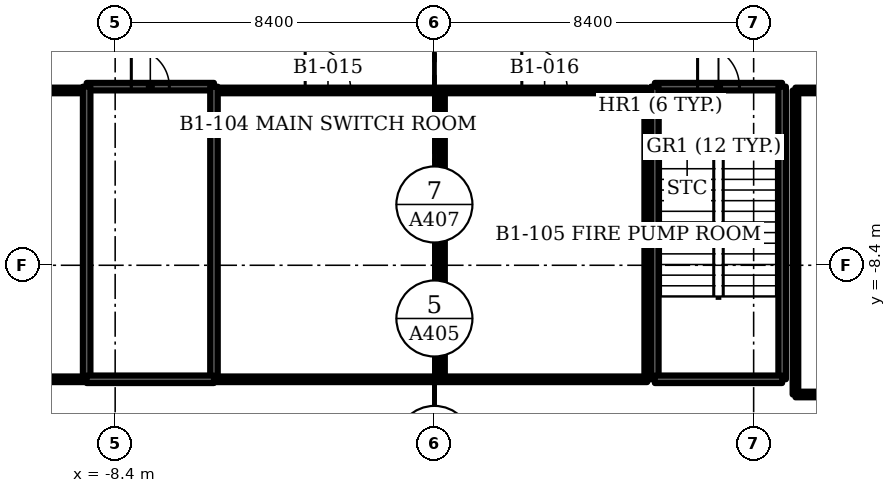
"""IFC4 building model, lengths in metres.
Left out: names, types, materials, properties, quantities, classifications, styles, units other than length and angle.
Written with IfcOpenShell. Run it as: python <this file> out.ifc"""

import sys

from ifc_helpers import new_model, si_unit, direction, frame, frame_2d, origin, place, context, subcontext, project, spatial, rectangle, extrude, element, fill, save


model = new_model("IFC4")
c1 = context("Model", 3, precision=1e-05, world=origin(), true_north=direction((0.0, 1.0)))
c2 = subcontext(c1, "Body", "Model", "MODEL_VIEW")
j1 = project(units=[si_unit("LENGTHUNIT", "METRE"), si_unit("PLANEANGLEUNIT", "RADIAN")], contexts=[c1])
p1 = place(None, origin())
s1 = spatial("IfcSite", under=j1, at=p1, CompositionType="ELEMENT")
p2 = place(p1, origin())
s2 = spatial("IfcBuilding", under=s1, at=p2, CompositionType="ELEMENT")
p3 = place(p2, frame((0.0, 0.0, -5.0)))
s3 = spatial("IfcBuildingStorey", under=s2, at=p3, CompositionType="ELEMENT", Elevation=-5.0)
p4 = place(p3, frame((5.8, -3.7, 0.0), z_axis=(0.0, 0.0, 1.0), x_axis=(1.0, 0.0, 0.0)))
e1 = element("IfcWall", 1, at=p4, inside=s3, PredefinedType="SOLIDWALL", context=c2, shape_type="SweptSolid", body=[
    extrude(rectangle(XDim=3.35, YDim=0.2, at=frame_2d((1.675, 0.0))), origin(), (0.0, 0.0, 1.0), 4.65),
])
p5 = place(p4, frame((1.125, 0.0, 0.0)))
e2 = element("IfcOpeningElement", 2, at=p5, cuts=e1, PredefinedType="OPENING", context=c2, shape_type="SweptSolid", body=[
    extrude(rectangle(XDim=1.1, YDim=2.1, at=frame_2d((0.55, 1.05))), frame((0.0, 0.1, 0.0), z_axis=(0.0, -1.0, 0.0), x_axis=(1.0, 0.0, 0.0)), (0.0, 0.0, 1.0), 0.2),
])
for number, where, z_axis, x_axis in (
    (3, (5.8, -3.7, 0.0), (0.0, 0.0, 1.0), (0.0, -1.0, 0.0)),
    (4, (9.15, -3.7, 0.0), (0.0, 0.0, 1.0), (0.0, -1.0, 0.0)),
):
    element("IfcWall", number, at=place(p3, frame(where, z_axis=z_axis, x_axis=x_axis)), inside=s3, PredefinedType="SOLIDWALL", context=c2, shape_type="SweptSolid", body=[
        extrude(rectangle(XDim=7.7, YDim=0.2, at=frame_2d((3.85, 0.0))), origin(), (0.0, 0.0, 1.0), 4.65),
    ])
p6 = place(p3, frame((5.8, -11.4, 0.0), z_axis=(0.0, 0.0, 1.0), x_axis=(1.0, 0.0, 0.0)))
e5 = element("IfcWall", 5, at=p6, inside=s3, PredefinedType="SOLIDWALL", context=c2, shape_type="SweptSolid", body=[
    extrude(rectangle(XDim=3.35, YDim=0.2, at=frame_2d((1.675, 0.0))), origin(), (0.0, 0.0, 1.0), 4.65),
])
p7 = place(p3, frame((-24.0, -3.8, 0.0), z_axis=(0.0, 0.0, 1.0), x_axis=(1.0, 0.0, 0.0)))
e6 = element("IfcWall", 6, at=p7, inside=s3, PredefinedType="PARTITIONING", context=c2, shape_type="SweptSolid", body=[
    extrude(rectangle(XDim=14.85, YDim=0.15, at=frame_2d((7.425, 0.0))), origin(), (0.0, 0.0, 1.0), 4.65),
])
p8 = place(p7, frame((3.9, 0.0, 0.0)))
e7 = element("IfcOpeningElement", 7, at=p8, cuts=e6, PredefinedType="OPENING", context=c2, shape_type="SweptSolid", body=[
    extrude(rectangle(XDim=1.2, YDim=2.1, at=frame_2d((0.6, 1.05))), frame((0.0, 0.075, 0.0), z_axis=(0.0, -1.0, 0.0), x_axis=(1.0, 0.0, 0.0)), (0.0, 0.0, 1.0), 0.15),
])
p9 = place(p7, frame((11.325, 0.0, 0.0)))
e8 = element("IfcOpeningElement", 8, at=p9, cuts=e6, PredefinedType="OPENING", context=c2, shape_type="SweptSolid", body=[
    extrude(rectangle(XDim=1.2, YDim=2.1, at=frame_2d((0.6, 1.05))), frame((0.0, 0.075, 0.0), z_axis=(0.0, -1.0, 0.0), x_axis=(1.0, 0.0, 0.0)), (0.0, 0.0, 1.0), 0.15),
])
p10 = place(p3, frame((-24.0, -11.4, 0.0), z_axis=(0.0, 0.0, 1.0), x_axis=(1.0, 0.0, 0.0)))
e9 = element("IfcWall", 9, at=p10, inside=s3, PredefinedType="PARTITIONING", context=c2, shape_type="SweptSolid", body=[
    extrude(rectangle(XDim=14.85, YDim=0.15, at=frame_2d((7.425, 0.0))), origin(), (0.0, 0.0, 1.0), 4.65),
])
p11 = place(p3, frame((-5.8, -3.8, 0.0), z_axis=(0.0, 0.0, 1.0), x_axis=(1.0, 0.0, 0.0)))
e10 = element("IfcWall", 10, at=p11, inside=s3, PredefinedType="PARTITIONING", context=c2, shape_type="SweptSolid", body=[
    extrude(rectangle(XDim=11.4, YDim=0.15, at=frame_2d((5.7, 0.0))), origin(), (0.0, 0.0, 1.0), 4.65),
])
p12 = place(p11, frame((2.4, 0.0, 0.0)))
e11 = element("IfcOpeningElement", 11, at=p12, cuts=e10, PredefinedType="OPENING", context=c2, shape_type="SweptSolid", body=[
    extrude(rectangle(XDim=1.2, YDim=2.1, at=frame_2d((0.6, 1.05))), frame((0.0, 0.075, 0.0), z_axis=(0.0, -1.0, 0.0), x_axis=(1.0, 0.0, 0.0)), (0.0, 0.0, 1.0), 0.15),
])
p13 = place(p11, frame((8.1, 0.0, 0.0)))
e12 = element("IfcOpeningElement", 12, at=p13, cuts=e10, PredefinedType="OPENING", context=c2, shape_type="SweptSolid", body=[
    extrude(rectangle(XDim=1.2, YDim=2.1, at=frame_2d((0.6, 1.05))), frame((0.0, 0.075, 0.0), z_axis=(0.0, -1.0, 0.0), x_axis=(1.0, 0.0, 0.0)), (0.0, 0.0, 1.0), 0.15),
])
p14 = place(p3, frame((-5.8, -11.4, 0.0), z_axis=(0.0, 0.0, 1.0), x_axis=(1.0, 0.0, 0.0)))
e13 = element("IfcWall", 13, at=p14, inside=s3, PredefinedType="PARTITIONING", context=c2, shape_type="SweptSolid", body=[
    extrude(rectangle(XDim=11.4, YDim=0.15, at=frame_2d((5.7, 0.0))), origin(), (0.0, 0.0, 1.0), 4.65),
])
for number, where, z_axis, x_axis in (
    (14, (0.2, -3.8, 0.0), (0.0, 0.0, 1.0), (0.0, -1.0, 0.0)),
    (15, (5.6, -3.8, 0.0), (0.0, 0.0, 1.0), (0.0, -1.0, 0.0)),
):
    element("IfcWall", number, at=place(p3, frame(where, z_axis=z_axis, x_axis=x_axis)), inside=s3, PredefinedType="PARTITIONING", context=c2, shape_type="SweptSolid", body=[
        extrude(rectangle(XDim=7.6, YDim=0.15, at=frame_2d((3.8, 0.0))), origin(), (0.0, 0.0, 1.0), 4.65),
    ])
p15 = place(p3, frame((-9.15, -3.7, 0.0), z_axis=(0.0, 0.0, 1.0), x_axis=(1.0, 0.0, 0.0)))
e16 = element("IfcWall", 16, at=p15, inside=s3, PredefinedType="SOLIDWALL", context=c2, shape_type="SweptSolid", body=[
    extrude(rectangle(XDim=3.35, YDim=0.2, at=frame_2d((1.675, 0.0))), origin(), (0.0, 0.0, 1.0), 4.65),
])
p16 = place(p15, frame((1.175, 0.0, 0.0)))
e17 = element("IfcOpeningElement", 17, at=p16, cuts=e16, PredefinedType="OPENING", context=c2, shape_type="SweptSolid", body=[
    extrude(rectangle(XDim=1.0, YDim=2.1, at=frame_2d((0.5, 1.05))), frame((0.0, 0.1, 0.0), z_axis=(0.0, -1.0, 0.0), x_axis=(1.0, 0.0, 0.0)), (0.0, 0.0, 1.0), 0.2),
])
for number, where, z_axis, x_axis in (
    (18, (-9.15, -3.7, 0.0), (0.0, 0.0, 1.0), (0.0, -1.0, 0.0)),
    (19, (-5.8, -3.7, 0.0), (0.0, 0.0, 1.0), (0.0, -1.0, 0.0)),
):
    element("IfcWall", number, at=place(p3, frame(where, z_axis=z_axis, x_axis=x_axis)), inside=s3, PredefinedType="SOLIDWALL", context=c2, shape_type="SweptSolid", body=[
        extrude(rectangle(XDim=7.7, YDim=0.2, at=frame_2d((3.85, 0.0))), origin(), (0.0, 0.0, 1.0), 4.65),
    ])
p17 = place(p3, frame((-9.15, -11.4, 0.0), z_axis=(0.0, 0.0, 1.0), x_axis=(1.0, 0.0, 0.0)))
e20 = element("IfcWall", 20, at=p17, inside=s3, PredefinedType="SOLIDWALL", context=c2, shape_type="SweptSolid", body=[
    extrude(rectangle(XDim=3.35, YDim=0.2, at=frame_2d((1.675, 0.0))), origin(), (0.0, 0.0, 1.0), 4.65),
])
p18 = place(p3, frame((9.5, -3.8, 0.0), z_axis=(0.0, 0.0, 1.0), x_axis=(1.0, 0.0, 0.0)))
e21 = element("IfcWall", 21, at=p18, inside=s3, PredefinedType="PARTITIONING", context=c2, shape_type="SweptSolid", body=[
    extrude(rectangle(XDim=14.0, YDim=0.15, at=frame_2d((7.0, 0.0))), origin(), (0.0, 0.0, 1.0), 4.65),
])
p19 = place(p18, frame((3.15, 0.0, 0.0)))
e22 = element("IfcOpeningElement", 22, at=p19, cuts=e21, PredefinedType="OPENING", context=c2, shape_type="SweptSolid", body=[
    extrude(rectangle(XDim=1.2, YDim=2.1, at=frame_2d((0.6, 1.05))), frame((0.0, 0.075, 0.0), z_axis=(0.0, -1.0, 0.0), x_axis=(1.0, 0.0, 0.0)), (0.0, 0.0, 1.0), 0.15),
])
p20 = place(p18, frame((10.15, 0.0, 0.0)))
e23 = element("IfcOpeningElement", 23, at=p20, cuts=e21, PredefinedType="OPENING", context=c2, shape_type="SweptSolid", body=[
    extrude(rectangle(XDim=1.2, YDim=2.1, at=frame_2d((0.6, 1.05))), frame((0.0, 0.075, 0.0), z_axis=(0.0, -1.0, 0.0), x_axis=(1.0, 0.0, 0.0)), (0.0, 0.0, 1.0), 0.15),
])
p21 = place(p3, frame((9.5, -11.8, 0.0), z_axis=(0.0, 0.0, 1.0), x_axis=(1.0, 0.0, 0.0)))
e24 = element("IfcWall", 24, at=p21, inside=s3, PredefinedType="PARTITIONING", context=c2, shape_type="SweptSolid", body=[
    extrude(rectangle(XDim=14.0, YDim=0.15, at=frame_2d((7.0, 0.0))), origin(), (0.0, 0.0, 1.0), 4.65),
])
p22 = place(p3, frame((9.5, -3.8, 0.0), z_axis=(0.0, 0.0, 1.0), x_axis=(0.0, -1.0, 0.0)))
e25 = element("IfcWall", 25, at=p22, inside=s3, PredefinedType="PARTITIONING", context=c2, shape_type="SweptSolid", body=[
    extrude(rectangle(XDim=8.0, YDim=0.15, at=frame_2d((4.0, 0.0))), origin(), (0.0, 0.0, 1.0), 4.65),
])
p23 = place(p5, origin())
e26 = element("IfcDoor", 26, at=p23, inside=s3, OperationType="SINGLE_SWING_LEFT", PredefinedType="DOOR", context=c2, shape_type="SweptSolid", body=[
    extrude(rectangle(XDim=1.1, YDim=2.1, at=frame_2d((0.55, 1.05))), frame((0.0, 0.025, 0.0), z_axis=(0.0, -1.0, 0.0), x_axis=(1.0, 0.0, 0.0)), (0.0, 0.0, 1.0), 0.05),
])
fill(e2, e26)
p24 = place(p12, origin())
e27 = element("IfcDoor", 27, at=p24, inside=s3, OperationType="SINGLE_SWING_LEFT", PredefinedType="DOOR", context=c2, shape_type="SweptSolid", body=[
    extrude(rectangle(XDim=1.2, YDim=2.1, at=frame_2d((0.6, 1.05))), frame((0.0, 0.025, 0.0), z_axis=(0.0, -1.0, 0.0), x_axis=(1.0, 0.0, 0.0)), (0.0, 0.0, 1.0), 0.05),
])
fill(e11, e27)
p25 = place(p13, origin())
e28 = element("IfcDoor", 28, at=p25, inside=s3, OperationType="SINGLE_SWING_LEFT", PredefinedType="DOOR", context=c2, shape_type="SweptSolid", body=[
    extrude(rectangle(XDim=1.2, YDim=2.1, at=frame_2d((0.6, 1.05))), frame((0.0, 0.025, 0.0), z_axis=(0.0, -1.0, 0.0), x_axis=(1.0, 0.0, 0.0)), (0.0, 0.0, 1.0), 0.05),
])
fill(e12, e28)
p26 = place(p16, origin())
e29 = element("IfcDoor", 29, at=p26, inside=s3, OperationType="SINGLE_SWING_LEFT", PredefinedType="DOOR", context=c2, shape_type="SweptSolid", body=[
    extrude(rectangle(XDim=1.0, YDim=2.1, at=frame_2d((0.5, 1.05))), frame((0.0, 0.025, 0.0), z_axis=(0.0, -1.0, 0.0), x_axis=(1.0, 0.0, 0.0)), (0.0, 0.0, 1.0), 0.05),
])
fill(e17, e29)
save(model, sys.argv[1])
